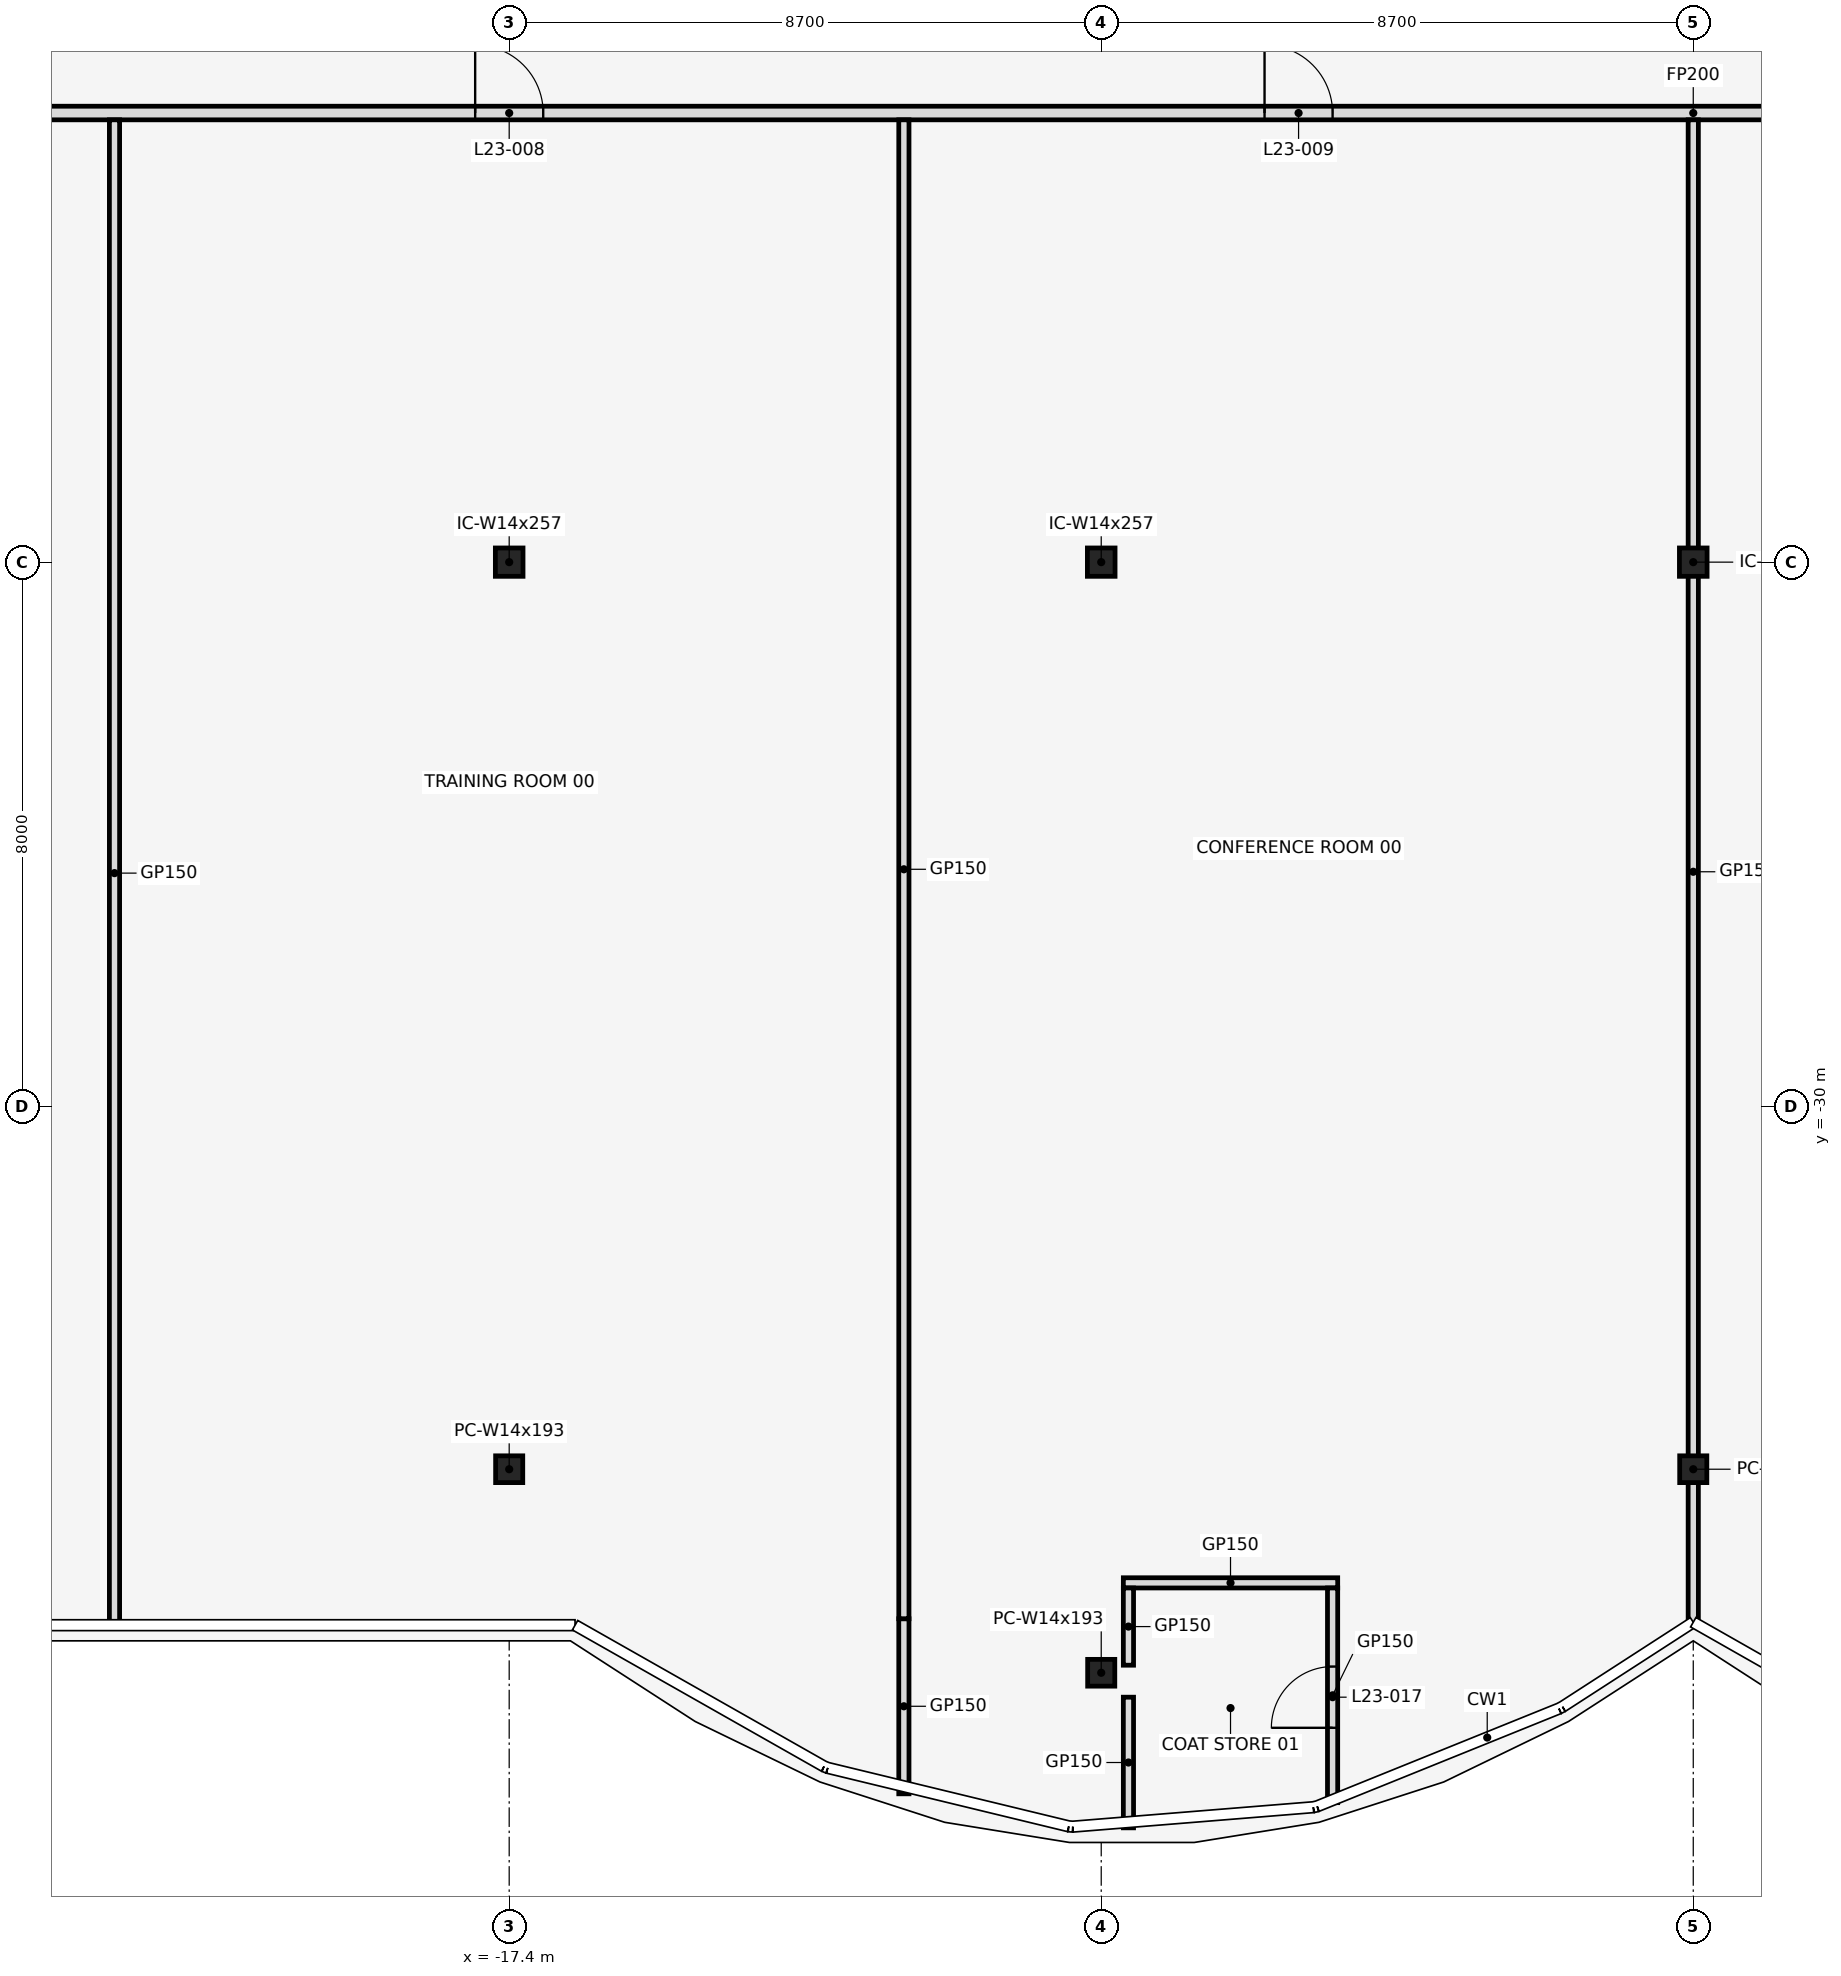
"""IFC4 building model, lengths in metres.
Left out: names, types, materials, properties, quantities, classifications, styles, units other than length and angle.
Written with IfcOpenShell. Run it as: python <this file> out.ifc"""

import sys

from ifc_helpers import new_model, si_unit, direction, frame, frame_2d, origin, origin_2d, place, context, subcontext, project, spatial, rectangle, i_section, extrude, element, fill, save


model = new_model("IFC4")
c1 = context("Model", 3, precision=1e-05, world=origin(), true_north=direction((0.0, 1.0)))
c2 = subcontext(c1, "Body", "Model", "MODEL_VIEW")
j1 = project(units=[si_unit("LENGTHUNIT", "METRE"), si_unit("PLANEANGLEUNIT", "RADIAN")], contexts=[c1])
p1 = place(None, origin())
s1 = spatial("IfcSite", under=j1, at=p1, CompositionType="ELEMENT")
p2 = place(p1, origin())
s2 = spatial("IfcBuilding", under=s1, at=p2, CompositionType="ELEMENT")
p3 = place(p2, frame((0.0, 0.0, 110.4)))
s3 = spatial("IfcBuildingStorey", under=s2, at=p3, CompositionType="ELEMENT", Elevation=110.4)
for number, where, z_axis, x_axis in (
    (1, (-17.4, -35.33, 0.0), (0.0, 0.0, 1.0), (1.0, 0.0, 0.0)),
    (2, (-8.7, -38.321, 0.0), (0.0, 0.0, 1.0), (1.0, 0.0, 0.0)),
    (3, (0.0, -35.33, 0.0), (0.0, 0.0, 1.0), (1.0, 0.0, 0.0)),
):
    element("IfcColumn", number, at=place(p3, frame(where, z_axis=z_axis, x_axis=x_axis)), inside=s3, PredefinedType="COLUMN", context=c2, shape_type="SweptSolid", body=[
        extrude(i_section(OverallWidth=0.399, OverallDepth=0.394, WebThickness=0.023, FlangeThickness=0.037, at=origin_2d()), origin(), (0.0, 0.0, 1.0), 4.1),
    ])
for number, where, z_axis, x_axis in (
    (4, (-17.4, -22.0, 0.0), (0.0, 0.0, 1.0), (1.0, 0.0, 0.0)),
    (5, (-8.7, -22.0, 0.0), (0.0, 0.0, 1.0), (1.0, 0.0, 0.0)),
    (6, (0.0, -22.0, 0.0), (0.0, 0.0, 1.0), (1.0, 0.0, 0.0)),
):
    element("IfcColumn", number, at=place(p3, frame(where, z_axis=z_axis, x_axis=x_axis)), inside=s3, PredefinedType="COLUMN", context=c2, shape_type="SweptSolid", body=[
        extrude(i_section(OverallWidth=0.406, OverallDepth=0.417, WebThickness=0.03, FlangeThickness=0.048, at=origin_2d()), origin(), (0.0, 0.0, 1.0), 4.1),
    ])
p4 = place(p3, frame((-8.375, -37.0, 0.0), z_axis=(0.0, 0.0, 1.0), x_axis=(1.0, 0.0, 0.0)))
e7 = element("IfcWall", 7, at=p4, inside=s3, PredefinedType="PARTITIONING", context=c2, shape_type="SweptSolid", body=[
    extrude(rectangle(XDim=3.15, YDim=0.15, at=frame_2d((1.575, 0.0))), origin(), (0.0, 0.0, 1.0), 3.018),
])
p5 = place(p3, frame((-33.37, -15.4, 0.0), z_axis=(0.0, 0.0, 1.0), x_axis=(1.0, 0.0, 0.0)))
e8 = element("IfcWall", 8, at=p5, inside=s3, PredefinedType="PARTITIONING", context=c2, shape_type="SweptSolid", body=[
    extrude(rectangle(XDim=66.74, YDim=0.2, at=frame_2d((33.37, 0.0))), origin(), (0.0, 0.0, 1.0), 3.018),
])
p6 = place(p5, frame((4.2, 0.0, 0.0)))
e9 = element("IfcOpeningElement", 9, at=p6, cuts=e8, PredefinedType="OPENING", context=c2, shape_type="SweptSolid", body=[
    extrude(rectangle(XDim=1.8, YDim=2.1, at=frame_2d((0.9, 1.05))), frame((0.0, 0.112, 0.0), z_axis=(0.0, -1.0, 0.0), x_axis=(1.0, 0.0, 0.0)), (0.0, 0.0, 1.0), 0.224),
])
p7 = place(p5, frame((15.47, 0.0, 0.0)))
e10 = element("IfcOpeningElement", 10, at=p7, cuts=e8, PredefinedType="OPENING", context=c2, shape_type="SweptSolid", body=[
    extrude(rectangle(XDim=1.0, YDim=2.1, at=frame_2d((0.5, 1.05))), frame((0.0, 0.112, 0.0), z_axis=(0.0, -1.0, 0.0), x_axis=(1.0, 0.0, 0.0)), (0.0, 0.0, 1.0), 0.224),
])
p8 = place(p5, frame((27.07, 0.0, 0.0)))
e11 = element("IfcOpeningElement", 11, at=p8, cuts=e8, PredefinedType="OPENING", context=c2, shape_type="SweptSolid", body=[
    extrude(rectangle(XDim=1.0, YDim=2.1, at=frame_2d((0.5, 1.05))), frame((0.0, 0.112, 0.0), z_axis=(0.0, -1.0, 0.0), x_axis=(1.0, 0.0, 0.0)), (0.0, 0.0, 1.0), 0.224),
])
p9 = place(p5, frame((39.67, 0.0, 0.0)))
e12 = element("IfcOpeningElement", 12, at=p9, cuts=e8, PredefinedType="OPENING", context=c2, shape_type="SweptSolid", body=[
    extrude(rectangle(XDim=1.8, YDim=2.1, at=frame_2d((0.9, 1.05))), frame((0.0, 0.112, 0.0), z_axis=(0.0, -1.0, 0.0), x_axis=(1.0, 0.0, 0.0)), (0.0, 0.0, 1.0), 0.224),
])
p10 = place(p5, frame((48.77, 0.0, 0.0)))
e13 = element("IfcOpeningElement", 13, at=p10, cuts=e8, PredefinedType="OPENING", context=c2, shape_type="SweptSolid", body=[
    extrude(rectangle(XDim=1.0, YDim=2.1, at=frame_2d((0.5, 1.05))), frame((0.0, 0.112, 0.0), z_axis=(0.0, -1.0, 0.0), x_axis=(1.0, 0.0, 0.0)), (0.0, 0.0, 1.0), 0.224),
])
p11 = place(p5, frame((54.67, 0.0, 0.0)))
e14 = element("IfcOpeningElement", 14, at=p11, cuts=e8, PredefinedType="OPENING", context=c2, shape_type="SweptSolid", body=[
    extrude(rectangle(XDim=0.9, YDim=2.1, at=frame_2d((0.45, 1.05))), frame((0.0, 0.112, 0.0), z_axis=(0.0, -1.0, 0.0), x_axis=(1.0, 0.0, 0.0)), (0.0, 0.0, 1.0), 0.224),
])
p12 = place(p5, frame((62.57, 0.0, 0.0)))
e15 = element("IfcOpeningElement", 15, at=p12, cuts=e8, PredefinedType="OPENING", context=c2, shape_type="SweptSolid", body=[
    extrude(rectangle(XDim=1.0, YDim=2.1, at=frame_2d((0.5, 1.05))), frame((0.0, 0.112, 0.0), z_axis=(0.0, -1.0, 0.0), x_axis=(1.0, 0.0, 0.0)), (0.0, 0.0, 1.0), 0.224),
])
p13 = place(p3, frame((-23.2, -37.64, 0.0), z_axis=(0.0, 0.0, 1.0), x_axis=(0.0, 1.0, 0.0)))
e16 = element("IfcWall", 16, at=p13, inside=s3, PredefinedType="PARTITIONING", context=c2, shape_type="SweptSolid", body=[
    extrude(rectangle(XDim=22.14, YDim=0.15, at=frame_2d((11.07, 0.0))), origin(), (0.0, 0.0, 1.0), 3.018),
])
p14 = place(p3, frame((-11.6, -40.1, 0.0), z_axis=(0.0, 0.0, 1.0), x_axis=(0.0, 1.0, 0.0)))
e17 = element("IfcWall", 17, at=p14, inside=s3, PredefinedType="PARTITIONING", context=c2, shape_type="SweptSolid", body=[
    extrude(rectangle(XDim=2.573, YDim=0.15, at=frame_2d((1.287, 0.0))), origin(), (0.0, 0.0, 1.0), 3.018),
])
p15 = place(p3, frame((-11.6, -37.527, 0.0), z_axis=(0.0, 0.0, 1.0), x_axis=(0.0, 1.0, 0.0)))
e18 = element("IfcWall", 18, at=p15, inside=s3, PredefinedType="PARTITIONING", context=c2, shape_type="SweptSolid", body=[
    extrude(rectangle(XDim=22.027, YDim=0.15, at=frame_2d((11.014, 0.0))), origin(), (0.0, 0.0, 1.0), 3.018),
])
p16 = place(p3, frame((-8.3, -40.6, 0.0), z_axis=(0.0, 0.0, 1.0), x_axis=(0.0, 1.0, 0.0)))
e19 = element("IfcWall", 19, at=p16, inside=s3, PredefinedType="PARTITIONING", context=c2, shape_type="SweptSolid", body=[
    extrude(rectangle(XDim=1.92, YDim=0.15, at=frame_2d((0.96, 0.0))), origin(), (0.0, 0.0, 1.0), 3.018),
])
p17 = place(p3, frame((-8.3, -38.21, 0.0), z_axis=(0.0, 0.0, 1.0), x_axis=(0.0, 1.0, 0.0)))
e20 = element("IfcWall", 20, at=p17, inside=s3, PredefinedType="PARTITIONING", context=c2, shape_type="SweptSolid", body=[
    extrude(rectangle(XDim=1.135, YDim=0.15, at=frame_2d((0.567, 0.0))), origin(), (0.0, 0.0, 1.0), 3.018),
])
p18 = place(p3, frame((-5.3, -40.23, 0.0), z_axis=(0.0, 0.0, 1.0), x_axis=(0.0, 1.0, 0.0)))
e21 = element("IfcWall", 21, at=p18, inside=s3, PredefinedType="PARTITIONING", context=c2, shape_type="SweptSolid", body=[
    extrude(rectangle(XDim=3.155, YDim=0.15, at=frame_2d((1.578, 0.0))), origin(), (0.0, 0.0, 1.0), 3.018),
])
p19 = place(p18, frame((1.1, 0.0, 0.0)))
e22 = element("IfcOpeningElement", 22, at=p19, cuts=e21, PredefinedType="OPENING", context=c2, shape_type="SweptSolid", body=[
    extrude(rectangle(XDim=0.9, YDim=2.1, at=frame_2d((0.45, 1.05))), frame((0.0, 0.087, 0.0), z_axis=(0.0, -1.0, 0.0), x_axis=(1.0, 0.0, 0.0)), (0.0, 0.0, 1.0), 0.174),
])
p20 = place(p3, frame((0.0, -37.6, 0.0), z_axis=(0.0, 0.0, 1.0), x_axis=(0.0, 1.0, 0.0)))
e23 = element("IfcWall", 23, at=p20, inside=s3, PredefinedType="PARTITIONING", context=c2, shape_type="SweptSolid", body=[
    extrude(rectangle(XDim=22.1, YDim=0.15, at=frame_2d((11.05, 0.0))), origin(), (0.0, 0.0, 1.0), 3.018),
])
p21 = place(p7, frame((1.0, 0.0, 0.0), z_axis=(0.0, 0.0, 1.0), x_axis=(-1.0, 0.0, 0.0)))
e24 = element("IfcDoor", 24, at=p21, inside=s3, OperationType="SINGLE_SWING_RIGHT", PredefinedType="DOOR", context=c2, shape_type="SweptSolid", body=[
    extrude(rectangle(XDim=1.0, YDim=2.1, at=frame_2d((0.5, 1.05))), frame((0.0, 0.025, 0.0), z_axis=(0.0, -1.0, 0.0), x_axis=(1.0, 0.0, 0.0)), (0.0, 0.0, 1.0), 0.05),
])
fill(e10, e24)
p22 = place(p8, frame((1.0, 0.0, 0.0), z_axis=(0.0, 0.0, 1.0), x_axis=(-1.0, 0.0, 0.0)))
e25 = element("IfcDoor", 25, at=p22, inside=s3, OperationType="SINGLE_SWING_RIGHT", PredefinedType="DOOR", context=c2, shape_type="SweptSolid", body=[
    extrude(rectangle(XDim=1.0, YDim=2.1, at=frame_2d((0.5, 1.05))), frame((0.0, 0.025, 0.0), z_axis=(0.0, -1.0, 0.0), x_axis=(1.0, 0.0, 0.0)), (0.0, 0.0, 1.0), 0.05),
])
fill(e11, e25)
p23 = place(p19, origin())
e26 = element("IfcDoor", 26, at=p23, inside=s3, OperationType="SINGLE_SWING_LEFT", PredefinedType="DOOR", context=c2, shape_type="SweptSolid", body=[
    extrude(rectangle(XDim=0.9, YDim=2.1, at=frame_2d((0.45, 1.05))), frame((0.0, 0.025, 0.0), z_axis=(0.0, -1.0, 0.0), x_axis=(1.0, 0.0, 0.0)), (0.0, 0.0, 1.0), 0.05),
])
fill(e22, e26)
save(model, sys.argv[1])
